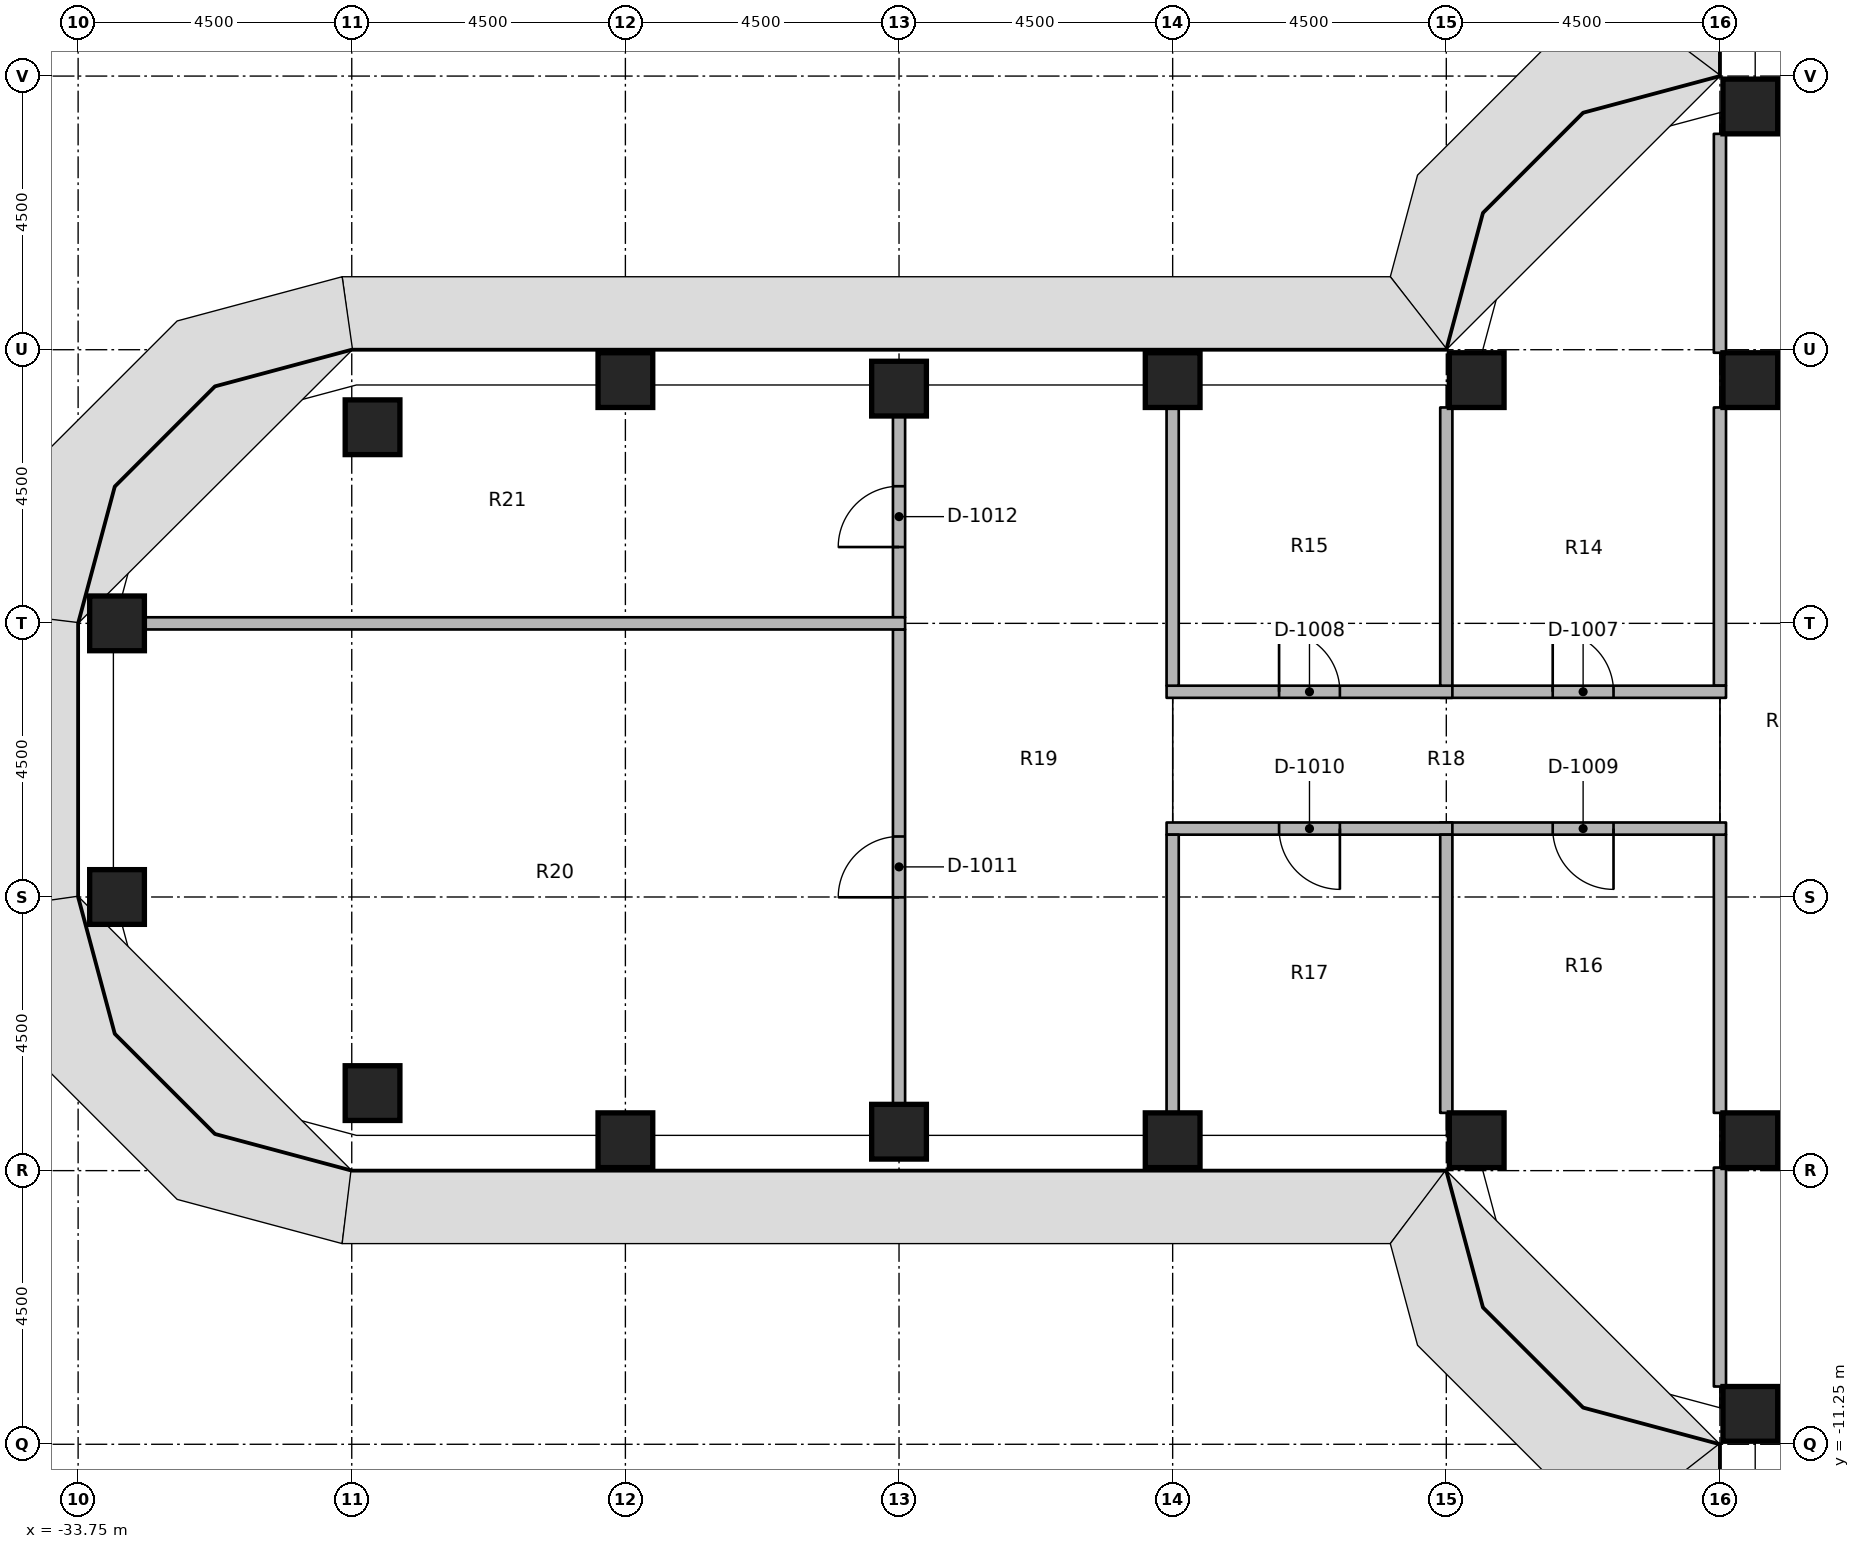
"""IFC4 building model, lengths in metres.
Left out: names, types, materials, properties, quantities, classifications, styles, units other than length and angle.
Written with IfcOpenShell. Run it as: python <this file> out.ifc"""

import sys

from ifc_helpers import new_model, si_unit, direction, frame, frame_2d, origin, origin_2d, place, context, subcontext, project, spatial, rectangle, extrude, element, fill, save


model = new_model("IFC4")
c1 = context("Model", 3, precision=1e-05, world=origin(), true_north=direction((0.0, 1.0)))
c2 = subcontext(c1, "Body", "Model", "MODEL_VIEW")
j1 = project(units=[si_unit("LENGTHUNIT", "METRE"), si_unit("PLANEANGLEUNIT", "RADIAN")], contexts=[c1])
p1 = place(None, origin())
s1 = spatial("IfcSite", under=j1, at=p1, CompositionType="ELEMENT")
p2 = place(p1, origin())
s2 = spatial("IfcBuilding", under=s1, at=p2, CompositionType="ELEMENT")
p3 = place(p2, frame((0.0, 0.0, 117.0)))
s3 = spatial("IfcBuildingStorey", under=s2, at=p3, CompositionType="ELEMENT", Elevation=117.0)
for number, where, z_axis, x_axis in (
    (1, (-33.11, -2.25, 0.0), (0.0, 0.0, 1.0), (1.0, 0.0, 0.0)),
    (2, (-33.11, 2.25, 0.0), (0.0, 0.0, 1.0), (1.0, 0.0, 0.0)),
    (3, (-28.908, -5.475, 0.0), (0.0, 0.0, 1.0), (1.0, 0.0, 0.0)),
    (4, (-28.908, 5.475, 0.0), (0.0, 0.0, 1.0), (1.0, 0.0, 0.0)),
    (5, (-24.75, -6.25, 0.0), (0.0, 0.0, 1.0), (1.0, 0.0, 0.0)),
    (6, (-24.75, 6.25, 0.0), (0.0, 0.0, 1.0), (1.0, 0.0, 0.0)),
    (7, (-20.25, -6.11, 0.0), (0.0, 0.0, 1.0), (1.0, 0.0, 0.0)),
    (8, (-20.25, 6.11, 0.0), (0.0, 0.0, 1.0), (1.0, 0.0, 0.0)),
    (9, (-15.75, -6.25, 0.0), (0.0, 0.0, 1.0), (1.0, 0.0, 0.0)),
    (10, (-15.75, 6.25, 0.0), (0.0, 0.0, 1.0), (1.0, 0.0, 0.0)),
    (11, (-10.75, -6.25, 0.0), (0.0, 0.0, 1.0), (1.0, 0.0, 0.0)),
    (12, (-10.75, 6.25, 0.0), (0.0, 0.0, 1.0), (1.0, 0.0, 0.0)),
    (13, (-6.25, -10.75, 0.0), (0.0, 0.0, 1.0), (1.0, 0.0, 0.0)),
    (14, (-6.25, -6.25, 0.0), (0.0, 0.0, 1.0), (1.0, 0.0, 0.0)),
    (15, (-6.25, 6.25, 0.0), (0.0, 0.0, 1.0), (1.0, 0.0, 0.0)),
    (16, (-6.25, 10.75, 0.0), (0.0, 0.0, 1.0), (1.0, 0.0, 0.0)),
):
    element("IfcColumn", number, at=place(p3, frame(where, z_axis=z_axis, x_axis=x_axis)), inside=s3, PredefinedType="COLUMN", context=c2, shape_type="SweptSolid", body=[
        extrude(rectangle(XDim=0.9, YDim=0.9, at=origin_2d()), origin(), (0.0, 0.0, 1.0), 3.65),
    ])
p4 = place(p3, frame((-6.75, 1.225, 0.0), z_axis=(0.0, 0.0, 1.0), x_axis=(0.0, 1.0, 0.0)))
e17 = element("IfcWall", 17, at=p4, inside=s3, PredefinedType="PARTITIONING", context=c2, shape_type="SweptSolid", body=[
    extrude(rectangle(XDim=4.575, YDim=0.2, at=frame_2d((2.288, 0.0))), origin(), (0.0, 0.0, 1.0), 2.738),
])
for number, where, z_axis, x_axis in (
    (18, (-6.75, 6.7, 0.0), (0.0, 0.0, 1.0), (0.0, 1.0, 0.0)),
    (19, (-6.75, -10.3, 0.0), (0.0, 0.0, 1.0), (0.0, 1.0, 0.0)),
):
    element("IfcWall", number, at=place(p3, frame(where, z_axis=z_axis, x_axis=x_axis)), inside=s3, PredefinedType="PARTITIONING", context=c2, shape_type="SweptSolid", body=[
        extrude(rectangle(XDim=3.6, YDim=0.2, at=frame_2d((1.8, 0.0))), origin(), (0.0, 0.0, 1.0), 2.738),
    ])
p5 = place(p3, frame((-6.75, -5.8, 0.0), z_axis=(0.0, 0.0, 1.0), x_axis=(0.0, 1.0, 0.0)))
e20 = element("IfcWall", 20, at=p5, inside=s3, PredefinedType="PARTITIONING", context=c2, shape_type="SweptSolid", body=[
    extrude(rectangle(XDim=4.575, YDim=0.2, at=frame_2d((2.288, 0.0))), origin(), (0.0, 0.0, 1.0), 2.738),
])
p6 = place(p3, frame((-11.35, 1.125, 0.0), z_axis=(0.0, 0.0, 1.0), x_axis=(1.0, 0.0, 0.0)))
e21 = element("IfcWall", 21, at=p6, inside=s3, PredefinedType="PARTITIONING", context=c2, shape_type="SweptSolid", body=[
    extrude(rectangle(XDim=4.7, YDim=0.2, at=frame_2d((2.35, 0.0))), origin(), (0.0, 0.0, 1.0), 2.738),
])
p7 = place(p6, frame((1.85, 0.0, 0.0)))
e22 = element("IfcOpeningElement", 22, at=p7, cuts=e21, PredefinedType="OPENING", context=c2, shape_type="SweptSolid", body=[
    extrude(rectangle(XDim=1.0, YDim=2.1, at=frame_2d((0.5, 1.05))), frame((0.0, 0.11, 0.0), z_axis=(0.0, -1.0, 0.0), x_axis=(1.0, 0.0, 0.0)), (0.0, 0.0, 1.0), 0.22),
])
p8 = place(p3, frame((-6.65, -1.125, 0.0), z_axis=(0.0, 0.0, 1.0), x_axis=(-1.0, 0.0, 0.0)))
e23 = element("IfcWall", 23, at=p8, inside=s3, PredefinedType="PARTITIONING", context=c2, shape_type="SweptSolid", body=[
    extrude(rectangle(XDim=4.7, YDim=0.2, at=frame_2d((2.35, 0.0))), origin(), (0.0, 0.0, 1.0), 2.738),
])
p9 = place(p8, frame((1.85, 0.0, 0.0)))
e24 = element("IfcOpeningElement", 24, at=p9, cuts=e23, PredefinedType="OPENING", context=c2, shape_type="SweptSolid", body=[
    extrude(rectangle(XDim=1.0, YDim=2.1, at=frame_2d((0.5, 1.05))), frame((0.0, 0.11, 0.0), z_axis=(0.0, -1.0, 0.0), x_axis=(1.0, 0.0, 0.0)), (0.0, 0.0, 1.0), 0.22),
])
p10 = place(p3, frame((-15.85, 1.125, 0.0), z_axis=(0.0, 0.0, 1.0), x_axis=(1.0, 0.0, 0.0)))
e25 = element("IfcWall", 25, at=p10, inside=s3, PredefinedType="PARTITIONING", context=c2, shape_type="SweptSolid", body=[
    extrude(rectangle(XDim=4.7, YDim=0.2, at=frame_2d((2.35, 0.0))), origin(), (0.0, 0.0, 1.0), 2.738),
])
p11 = place(p10, frame((1.85, 0.0, 0.0)))
e26 = element("IfcOpeningElement", 26, at=p11, cuts=e25, PredefinedType="OPENING", context=c2, shape_type="SweptSolid", body=[
    extrude(rectangle(XDim=1.0, YDim=2.1, at=frame_2d((0.5, 1.05))), frame((0.0, 0.11, 0.0), z_axis=(0.0, -1.0, 0.0), x_axis=(1.0, 0.0, 0.0)), (0.0, 0.0, 1.0), 0.22),
])
p12 = place(p3, frame((-11.15, -1.125, 0.0), z_axis=(0.0, 0.0, 1.0), x_axis=(-1.0, 0.0, 0.0)))
e27 = element("IfcWall", 27, at=p12, inside=s3, PredefinedType="PARTITIONING", context=c2, shape_type="SweptSolid", body=[
    extrude(rectangle(XDim=4.7, YDim=0.2, at=frame_2d((2.35, 0.0))), origin(), (0.0, 0.0, 1.0), 2.738),
])
p13 = place(p12, frame((1.85, 0.0, 0.0)))
e28 = element("IfcOpeningElement", 28, at=p13, cuts=e27, PredefinedType="OPENING", context=c2, shape_type="SweptSolid", body=[
    extrude(rectangle(XDim=1.0, YDim=2.1, at=frame_2d((0.5, 1.05))), frame((0.0, 0.11, 0.0), z_axis=(0.0, -1.0, 0.0), x_axis=(1.0, 0.0, 0.0)), (0.0, 0.0, 1.0), 0.22),
])
for number, where, z_axis, x_axis in (
    (29, (-11.25, 1.225, 0.0), (0.0, 0.0, 1.0), (0.0, 1.0, 0.0)),
    (30, (-11.25, -5.8, 0.0), (0.0, 0.0, 1.0), (0.0, 1.0, 0.0)),
    (31, (-15.75, 1.225, 0.0), (0.0, 0.0, 1.0), (0.0, 1.0, 0.0)),
    (32, (-15.75, -5.8, 0.0), (0.0, 0.0, 1.0), (0.0, 1.0, 0.0)),
):
    element("IfcWall", number, at=place(p3, frame(where, z_axis=z_axis, x_axis=x_axis)), inside=s3, PredefinedType="PARTITIONING", context=c2, shape_type="SweptSolid", body=[
        extrude(rectangle(XDim=4.575, YDim=0.2, at=frame_2d((2.288, 0.0))), origin(), (0.0, 0.0, 1.0), 2.738),
    ])
p14 = place(p3, frame((-20.25, -5.66, 0.0), z_axis=(0.0, 0.0, 1.0), x_axis=(0.0, 1.0, 0.0)))
e33 = element("IfcWall", 33, at=p14, inside=s3, PredefinedType="PARTITIONING", context=c2, shape_type="SweptSolid", body=[
    extrude(rectangle(XDim=7.81, YDim=0.2, at=frame_2d((3.905, 0.0))), origin(), (0.0, 0.0, 1.0), 2.738),
])
p15 = place(p14, frame((3.405, 0.0, 0.0)))
e34 = element("IfcOpeningElement", 34, at=p15, cuts=e33, PredefinedType="OPENING", context=c2, shape_type="SweptSolid", body=[
    extrude(rectangle(XDim=1.0, YDim=2.1, at=frame_2d((0.5, 1.05))), frame((0.0, 0.11, 0.0), z_axis=(0.0, -1.0, 0.0), x_axis=(1.0, 0.0, 0.0)), (0.0, 0.0, 1.0), 0.22),
])
p16 = place(p3, frame((-20.25, 2.35, 0.0), z_axis=(0.0, 0.0, 1.0), x_axis=(0.0, 1.0, 0.0)))
e35 = element("IfcWall", 35, at=p16, inside=s3, PredefinedType="PARTITIONING", context=c2, shape_type="SweptSolid", body=[
    extrude(rectangle(XDim=3.31, YDim=0.2, at=frame_2d((1.655, 0.0))), origin(), (0.0, 0.0, 1.0), 2.738),
])
p17 = place(p16, frame((1.155, 0.0, 0.0)))
e36 = element("IfcOpeningElement", 36, at=p17, cuts=e35, PredefinedType="OPENING", context=c2, shape_type="SweptSolid", body=[
    extrude(rectangle(XDim=1.0, YDim=2.1, at=frame_2d((0.5, 1.05))), frame((0.0, 0.11, 0.0), z_axis=(0.0, -1.0, 0.0), x_axis=(1.0, 0.0, 0.0)), (0.0, 0.0, 1.0), 0.22),
])
p18 = place(p3, frame((-32.66, 2.25, 0.0), z_axis=(0.0, 0.0, 1.0), x_axis=(1.0, 0.0, 0.0)))
e37 = element("IfcWall", 37, at=p18, inside=s3, PredefinedType="PARTITIONING", context=c2, shape_type="SweptSolid", body=[
    extrude(rectangle(XDim=12.51, YDim=0.2, at=frame_2d((6.255, 0.0))), origin(), (0.0, 0.0, 1.0), 2.738),
])
p19 = place(p7, origin())
e38 = element("IfcDoor", 38, at=p19, inside=s3, OperationType="SINGLE_SWING_RIGHT", PredefinedType="DOOR", context=c2, shape_type="SweptSolid", body=[
    extrude(rectangle(XDim=1.0, YDim=2.1, at=frame_2d((0.5, 1.05))), frame((0.0, 0.025, 0.0), z_axis=(0.0, -1.0, 0.0), x_axis=(1.0, 0.0, 0.0)), (0.0, 0.0, 1.0), 0.05),
])
fill(e22, e38)
p20 = place(p11, origin())
e39 = element("IfcDoor", 39, at=p20, inside=s3, OperationType="SINGLE_SWING_RIGHT", PredefinedType="DOOR", context=c2, shape_type="SweptSolid", body=[
    extrude(rectangle(XDim=1.0, YDim=2.1, at=frame_2d((0.5, 1.05))), frame((0.0, 0.025, 0.0), z_axis=(0.0, -1.0, 0.0), x_axis=(1.0, 0.0, 0.0)), (0.0, 0.0, 1.0), 0.05),
])
fill(e26, e39)
p21 = place(p9, origin())
e40 = element("IfcDoor", 40, at=p21, inside=s3, OperationType="SINGLE_SWING_RIGHT", PredefinedType="DOOR", context=c2, shape_type="SweptSolid", body=[
    extrude(rectangle(XDim=1.0, YDim=2.1, at=frame_2d((0.5, 1.05))), frame((0.0, 0.025, 0.0), z_axis=(0.0, -1.0, 0.0), x_axis=(1.0, 0.0, 0.0)), (0.0, 0.0, 1.0), 0.05),
])
fill(e24, e40)
p22 = place(p13, origin())
e41 = element("IfcDoor", 41, at=p22, inside=s3, OperationType="SINGLE_SWING_RIGHT", PredefinedType="DOOR", context=c2, shape_type="SweptSolid", body=[
    extrude(rectangle(XDim=1.0, YDim=2.1, at=frame_2d((0.5, 1.05))), frame((0.0, 0.025, 0.0), z_axis=(0.0, -1.0, 0.0), x_axis=(1.0, 0.0, 0.0)), (0.0, 0.0, 1.0), 0.05),
])
fill(e28, e41)
p23 = place(p15, origin())
e42 = element("IfcDoor", 42, at=p23, inside=s3, OperationType="SINGLE_SWING_RIGHT", PredefinedType="DOOR", context=c2, shape_type="SweptSolid", body=[
    extrude(rectangle(XDim=1.0, YDim=2.1, at=frame_2d((0.5, 1.05))), frame((0.0, 0.025, 0.0), z_axis=(0.0, -1.0, 0.0), x_axis=(1.0, 0.0, 0.0)), (0.0, 0.0, 1.0), 0.05),
])
fill(e34, e42)
p24 = place(p17, origin())
e43 = element("IfcDoor", 43, at=p24, inside=s3, OperationType="SINGLE_SWING_LEFT", PredefinedType="DOOR", context=c2, shape_type="SweptSolid", body=[
    extrude(rectangle(XDim=1.0, YDim=2.1, at=frame_2d((0.5, 1.05))), frame((0.0, 0.025, 0.0), z_axis=(0.0, -1.0, 0.0), x_axis=(1.0, 0.0, 0.0)), (0.0, 0.0, 1.0), 0.05),
])
fill(e36, e43)
save(model, sys.argv[1])
